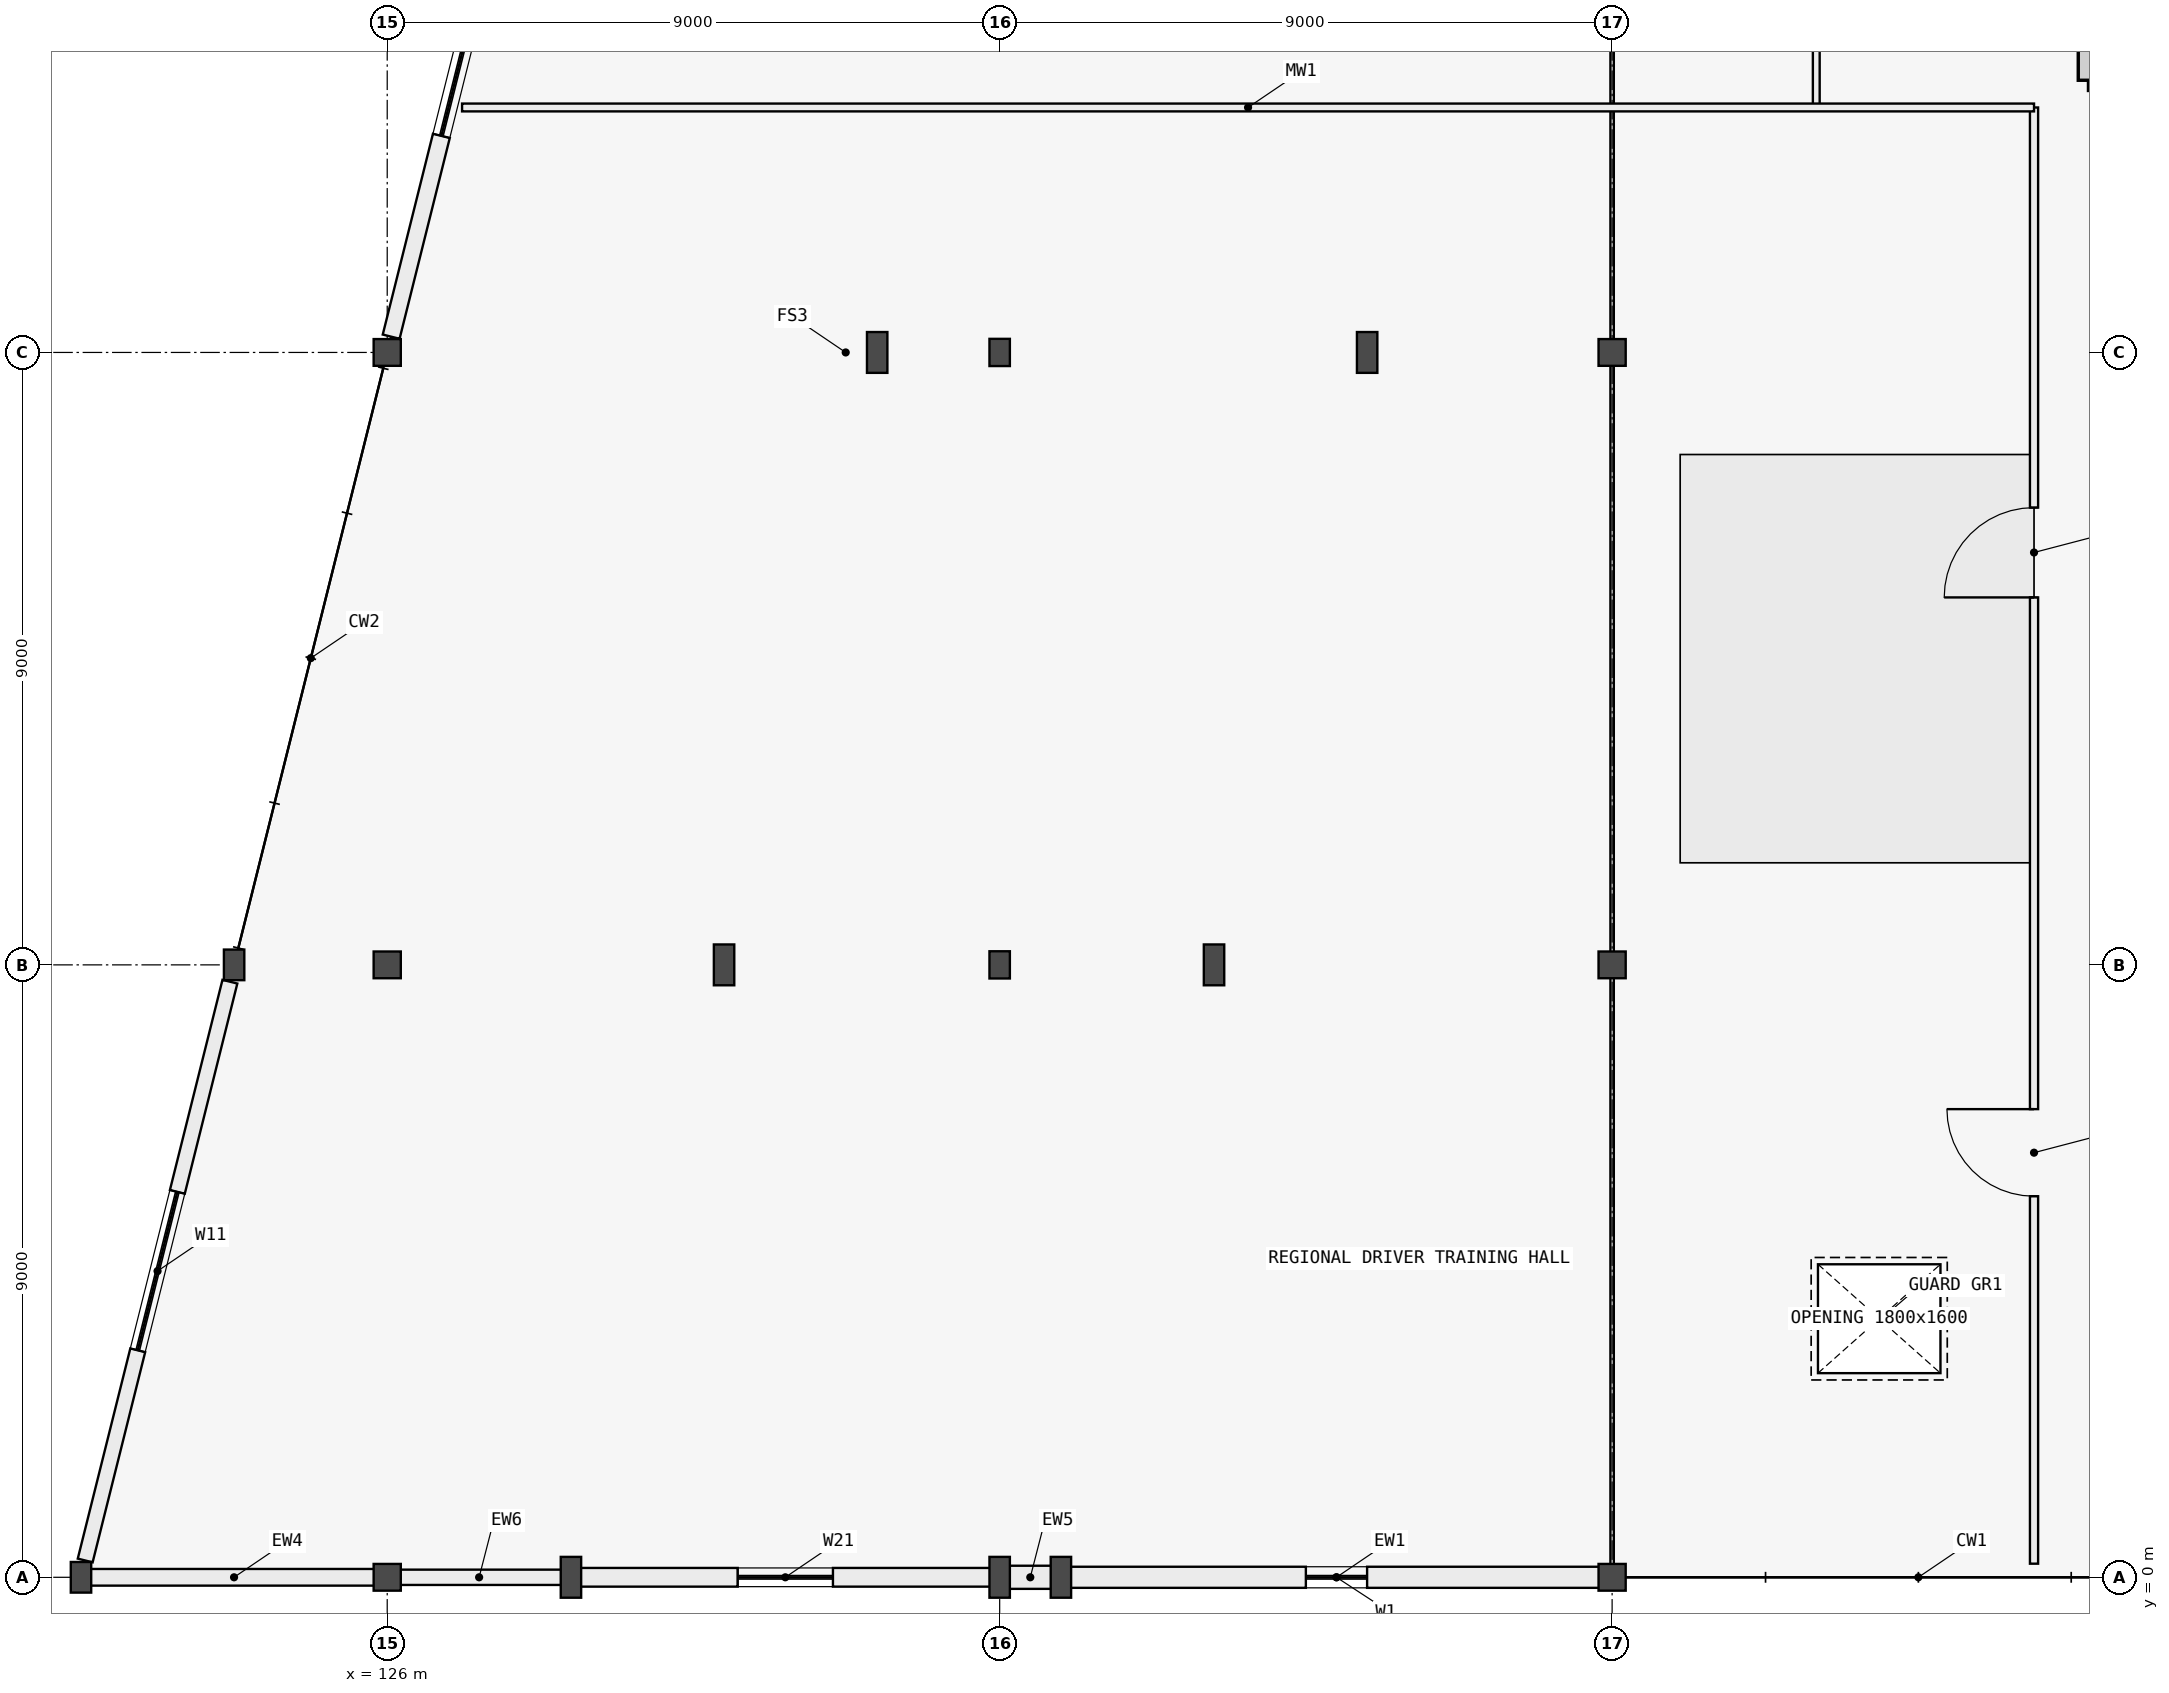
"""IFC4 building model, lengths in metres.
Left out: names, types, materials, properties, quantities, classifications, styles, units other than length and angle.
Written with IfcOpenShell. Run it as: python <this file> out.ifc"""

import sys

from ifc_helpers import new_model, si_unit, direction, frame, frame_2d, origin, origin_2d, place, context, subcontext, project, spatial, rectangle, i_section, extrude, element, fill, save


model = new_model("IFC4")
c1 = context("Model", 3, precision=1e-05, world=origin(), true_north=direction((0.0, 1.0)))
c2 = subcontext(c1, "Body", "Model", "MODEL_VIEW")
j1 = project(units=[si_unit("LENGTHUNIT", "METRE"), si_unit("PLANEANGLEUNIT", "RADIAN")], contexts=[c1])
p1 = place(None, origin())
s1 = spatial("IfcSite", under=j1, at=p1, CompositionType="ELEMENT")
p2 = place(p1, origin())
s2 = spatial("IfcBuilding", under=s1, at=p2, CompositionType="ELEMENT")
p3 = place(p2, frame((0.0, 0.0, 12.6)))
s3 = spatial("IfcBuildingStorey", under=s2, at=p3, CompositionType="ELEMENT", Elevation=12.6)
p4 = place(p3, frame((121.5, 0.0, 0.0), z_axis=(0.0, 0.0, 1.0), x_axis=(1.0, 0.0, 0.0)))
e1 = element("IfcColumn", 1, at=p4, inside=s3, PredefinedType="COLUMN", context=c2, shape_type="SweptSolid", body=[
    extrude(i_section(OverallWidth=0.3, OverallDepth=0.45, WebThickness=0.014, FlangeThickness=0.026, FilletRadius=0.027, at=origin_2d()), origin(), (0.0, 0.0, 1.0), 4.2),
])
p5 = place(p3, frame((126.0, 0.0, 0.0), z_axis=(0.0, 0.0, 1.0), x_axis=(1.0, 0.0, 0.0)))
e2 = element("IfcColumn", 2, at=p5, inside=s3, PredefinedType="COLUMN", context=c2, shape_type="SweptSolid", body=[
    extrude(i_section(OverallWidth=0.399, OverallDepth=0.393, WebThickness=0.018, FlangeThickness=0.028, FilletRadius=0.015, at=origin_2d()), origin(), (0.0, 0.0, 1.0), 4.2),
])
for number, where, z_axis, x_axis in (
    (3, (128.7, 0.0, 0.0), (0.0, 0.0, 1.0), (1.0, 0.0, 0.0)),
    (4, (135.0, 0.0, 0.0), (0.0, 0.0, 1.0), (1.0, 0.0, 0.0)),
    (5, (135.9, 0.0, 0.0), (0.0, 0.0, 1.0), (1.0, 0.0, 0.0)),
):
    element("IfcColumn", number, at=place(p3, frame(where, z_axis=z_axis, x_axis=x_axis)), inside=s3, PredefinedType="COLUMN", context=c2, shape_type="SweptSolid", body=[
        extrude(i_section(OverallWidth=0.3, OverallDepth=0.6, WebThickness=0.015, FlangeThickness=0.03, FilletRadius=0.027, at=origin_2d()), origin(), (0.0, 0.0, 1.0), 4.2),
    ])
p6 = place(p3, frame((144.0, 0.0, 0.0), z_axis=(0.0, 0.0, 1.0), x_axis=(1.0, 0.0, 0.0)))
e6 = element("IfcColumn", 6, at=p6, inside=s3, PredefinedType="COLUMN", context=c2, shape_type="SweptSolid", body=[
    extrude(i_section(OverallWidth=0.399, OverallDepth=0.393, WebThickness=0.018, FlangeThickness=0.028, FilletRadius=0.015, at=origin_2d()), origin(), (0.0, 0.0, 1.0), 4.2),
])
p7 = place(p3, frame((123.75, 9.0, 0.0), z_axis=(0.0, 0.0, 1.0), x_axis=(1.0, 0.0, 0.0)))
e7 = element("IfcColumn", 7, at=p7, inside=s3, PredefinedType="COLUMN", context=c2, shape_type="SweptSolid", body=[
    extrude(i_section(OverallWidth=0.3, OverallDepth=0.45, WebThickness=0.014, FlangeThickness=0.026, FilletRadius=0.027, at=origin_2d()), origin(), (0.0, 0.0, 1.0), 4.2),
])
p8 = place(p3, frame((126.0, 9.0, 0.0), z_axis=(0.0, 0.0, 1.0), x_axis=(1.0, 0.0, 0.0)))
e8 = element("IfcColumn", 8, at=p8, inside=s3, PredefinedType="COLUMN", context=c2, shape_type="SweptSolid", body=[
    extrude(i_section(OverallWidth=0.399, OverallDepth=0.393, WebThickness=0.018, FlangeThickness=0.028, FilletRadius=0.015, at=origin_2d()), origin(), (0.0, 0.0, 1.0), 4.2),
])
p9 = place(p3, frame((130.95, 9.0, 0.0), z_axis=(0.0, 0.0, 1.0), x_axis=(1.0, 0.0, 0.0)))
e9 = element("IfcColumn", 9, at=p9, inside=s3, PredefinedType="COLUMN", context=c2, shape_type="SweptSolid", body=[
    extrude(i_section(OverallWidth=0.3, OverallDepth=0.6, WebThickness=0.015, FlangeThickness=0.03, FilletRadius=0.027, at=origin_2d()), origin(), (0.0, 0.0, 1.0), 4.2),
])
p10 = place(p3, frame((135.0, 9.0, 0.0), z_axis=(0.0, 0.0, 1.0), x_axis=(1.0, 0.0, 0.0)))
e10 = element("IfcColumn", 10, at=p10, inside=s3, PredefinedType="COLUMN", context=c2, shape_type="SweptSolid", body=[
    extrude(i_section(OverallWidth=0.3, OverallDepth=0.4, WebThickness=0.013, FlangeThickness=0.024, FilletRadius=0.027, at=origin_2d()), origin(), (0.0, 0.0, 1.0), 4.2),
])
p11 = place(p3, frame((138.15, 9.0, 0.0), z_axis=(0.0, 0.0, 1.0), x_axis=(1.0, 0.0, 0.0)))
e11 = element("IfcColumn", 11, at=p11, inside=s3, PredefinedType="COLUMN", context=c2, shape_type="SweptSolid", body=[
    extrude(i_section(OverallWidth=0.3, OverallDepth=0.6, WebThickness=0.015, FlangeThickness=0.03, FilletRadius=0.027, at=origin_2d()), origin(), (0.0, 0.0, 1.0), 4.2),
])
for number, where, z_axis, x_axis in (
    (12, (144.0, 9.0, 0.0), (0.0, 0.0, 1.0), (1.0, 0.0, 0.0)),
    (13, (126.0, 18.0, 0.0), (0.0, 0.0, 1.0), (1.0, 0.0, 0.0)),
):
    element("IfcColumn", number, at=place(p3, frame(where, z_axis=z_axis, x_axis=x_axis)), inside=s3, PredefinedType="COLUMN", context=c2, shape_type="SweptSolid", body=[
        extrude(i_section(OverallWidth=0.399, OverallDepth=0.393, WebThickness=0.018, FlangeThickness=0.028, FilletRadius=0.015, at=origin_2d()), origin(), (0.0, 0.0, 1.0), 4.2),
    ])
p12 = place(p3, frame((133.2, 18.0, 0.0), z_axis=(0.0, 0.0, 1.0), x_axis=(1.0, 0.0, 0.0)))
e14 = element("IfcColumn", 14, at=p12, inside=s3, PredefinedType="COLUMN", context=c2, shape_type="SweptSolid", body=[
    extrude(i_section(OverallWidth=0.3, OverallDepth=0.6, WebThickness=0.015, FlangeThickness=0.03, FilletRadius=0.027, at=origin_2d()), origin(), (0.0, 0.0, 1.0), 4.2),
])
p13 = place(p3, frame((135.0, 18.0, 0.0), z_axis=(0.0, 0.0, 1.0), x_axis=(1.0, 0.0, 0.0)))
e15 = element("IfcColumn", 15, at=p13, inside=s3, PredefinedType="COLUMN", context=c2, shape_type="SweptSolid", body=[
    extrude(i_section(OverallWidth=0.3, OverallDepth=0.4, WebThickness=0.013, FlangeThickness=0.024, FilletRadius=0.027, at=origin_2d()), origin(), (0.0, 0.0, 1.0), 4.2),
])
p14 = place(p3, frame((140.4, 18.0, 0.0), z_axis=(0.0, 0.0, 1.0), x_axis=(1.0, 0.0, 0.0)))
e16 = element("IfcColumn", 16, at=p14, inside=s3, PredefinedType="COLUMN", context=c2, shape_type="SweptSolid", body=[
    extrude(i_section(OverallWidth=0.3, OverallDepth=0.6, WebThickness=0.015, FlangeThickness=0.03, FilletRadius=0.027, at=origin_2d()), origin(), (0.0, 0.0, 1.0), 4.2),
])
p15 = place(p3, frame((144.0, 18.0, 0.0), z_axis=(0.0, 0.0, 1.0), x_axis=(1.0, 0.0, 0.0)))
e17 = element("IfcColumn", 17, at=p15, inside=s3, PredefinedType="COLUMN", context=c2, shape_type="SweptSolid", body=[
    extrude(i_section(OverallWidth=0.399, OverallDepth=0.393, WebThickness=0.018, FlangeThickness=0.028, FilletRadius=0.015, at=origin_2d()), origin(), (0.0, 0.0, 1.0), 4.2),
])
p16 = place(p3, frame((121.507, 0.0, 0.0), z_axis=(0.0, 0.0, 1.0), x_axis=(1.0, 0.0, 0.0)))
e18 = element("IfcWall", 18, at=p16, inside=s3, PredefinedType="STANDARD", context=c2, shape_type="SweptSolid", body=[
    extrude(rectangle(XDim=4.484, YDim=0.245, at=frame_2d((2.242, 0.0))), origin(), (0.0, 0.0, 1.0), 3.63),
])
p17 = place(p3, frame((126.009, 0.0, 0.0), z_axis=(0.0, 0.0, 1.0), x_axis=(1.0, 0.0, 0.0)))
e19 = element("IfcWall", 19, at=p17, inside=s3, PredefinedType="STANDARD", context=c2, shape_type="SweptSolid", body=[
    extrude(rectangle(XDim=2.684, YDim=0.225, at=frame_2d((1.342, 0.0))), origin(), (0.0, 0.0, 1.0), 3.63),
])
p18 = place(p3, frame((128.708, 0.0, 0.0), z_axis=(0.0, 0.0, 1.0), x_axis=(1.0, 0.0, 0.0)))
e20 = element("IfcWall", 20, at=p18, inside=s3, PredefinedType="POLYGONAL", context=c2, shape_type="SweptSolid", body=[
    extrude(rectangle(XDim=6.284, YDim=0.275, at=frame_2d((3.142, 0.0))), origin(), (0.0, 0.0, 1.0), 3.63),
])
p19 = place(p18, frame((2.442, 0.0, 0.95)))
e21 = element("IfcOpeningElement", 21, at=p19, cuts=e20, PredefinedType="OPENING", context=c2, shape_type="SweptSolid", body=[
    extrude(rectangle(XDim=1.4, YDim=2.0, at=frame_2d((0.7, 1.0))), frame((0.0, 0.147, 0.0), z_axis=(0.0, -1.0, 0.0), x_axis=(1.0, 0.0, 0.0)), (0.0, 0.0, 1.0), 0.295),
])
p20 = place(p3, frame((135.008, 0.0, 0.0), z_axis=(0.0, 0.0, 1.0), x_axis=(1.0, 0.0, 0.0)))
e22 = element("IfcWall", 22, at=p20, inside=s3, PredefinedType="STANDARD", context=c2, shape_type="SweptSolid", body=[
    extrude(rectangle(XDim=0.885, YDim=0.34, at=frame_2d((0.442, 0.0))), origin(), (0.0, 0.0, 1.0), 3.63),
])
p21 = place(p3, frame((135.908, 0.0, 0.0), z_axis=(0.0, 0.0, 1.0), x_axis=(1.0, 0.0, 0.0)))
e23 = element("IfcWall", 23, at=p21, inside=s3, PredefinedType="STANDARD", context=c2, shape_type="SweptSolid", body=[
    extrude(rectangle(XDim=8.083, YDim=0.31, at=frame_2d((4.042, 0.0))), origin(), (0.0, 0.0, 1.0), 3.6),
])
p22 = place(p21, frame((3.592, 0.0, 0.95)))
e24 = element("IfcOpeningElement", 24, at=p22, cuts=e23, PredefinedType="OPENING", context=c2, shape_type="SweptSolid", body=[
    extrude(rectangle(XDim=0.9, YDim=1.2, at=frame_2d((0.45, 0.6))), frame((0.0, 0.165, 0.0), z_axis=(0.0, -1.0, 0.0), x_axis=(1.0, 0.0, 0.0)), (0.0, 0.0, 1.0), 0.33),
])
p23 = place(p3, frame((121.562, 0.247, 0.0), z_axis=(0.0, 0.0, 1.0), x_axis=(0.242535625036, 0.970142500145, 0.0)))
e25 = element("IfcWall", 25, at=p23, inside=s3, PredefinedType="STANDARD", context=c2, shape_type="SweptSolid", body=[
    extrude(rectangle(XDim=8.768, YDim=0.225, at=frame_2d((4.384, 0.0))), origin(), (0.0, 0.0, 1.0), 3.925),
])
p24 = place(p23, frame((3.184, 0.0, 0.95)))
e26 = element("IfcOpeningElement", 26, at=p24, cuts=e25, PredefinedType="OPENING", context=c2, shape_type="SweptSolid", body=[
    extrude(rectangle(XDim=2.4, YDim=1.8, at=frame_2d((1.2, 0.9))), frame((0.0, 0.123, 0.0), z_axis=(0.0, -1.0, 0.0), x_axis=(1.0, 0.0, 0.0)), (0.0, 0.0, 1.0), 0.245),
])
p25 = place(p3, frame((126.058, 18.232, 0.0), z_axis=(0.0, 0.0, 1.0), x_axis=(0.242522544412, 0.970145770208, 0.0)))
e27 = element("IfcWall", 27, at=p25, inside=s3, PredefinedType="POLYGONAL", context=c2, shape_type="SweptSolid", body=[
    extrude(rectangle(XDim=8.783, YDim=0.255, at=frame_2d((4.392, 0.0))), origin(), (0.0, 0.0, 1.0), 3.45),
])
p26 = place(p25, frame((3.042, 0.0, 0.95)))
e28 = element("IfcOpeningElement", 28, at=p26, cuts=e27, PredefinedType="OPENING", context=c2, shape_type="SweptSolid", body=[
    extrude(rectangle(XDim=2.7, YDim=1.6, at=frame_2d((1.35, 0.8))), frame((0.0, 0.137, 0.0), z_axis=(0.0, -1.0, 0.0), x_axis=(1.0, 0.0, 0.0)), (0.0, 0.0, 1.0), 0.275),
])
p27 = place(p3, frame((151.0, 22.0, 0.0), z_axis=(0.0, 0.0, 1.0), x_axis=(1.0, 0.0, 0.0)))
e29 = element("IfcWall", 29, at=p27, inside=s3, PredefinedType="SHEAR", context=c2, shape_type="SweptSolid", body=[
    extrude(rectangle(XDim=10.2, YDim=0.3, at=frame_2d((5.1, 0.0))), origin(), (0.0, 0.0, 1.0), 3.925),
])
p28 = place(p27, frame((4.75, 0.0, 0.0)))
e30 = element("IfcOpeningElement", 30, at=p28, cuts=e29, PredefinedType="OPENING", context=c2, shape_type="SweptSolid", body=[
    extrude(rectangle(XDim=1.2, YDim=2.15, at=frame_2d((0.6, 1.075))), frame((0.0, 0.16, 0.0), z_axis=(0.0, -1.0, 0.0), x_axis=(1.0, 0.0, 0.0)), (0.0, 0.0, 1.0), 0.32),
])
p29 = place(p3, frame((151.0, 30.2, 0.0), z_axis=(0.0, 0.0, 1.0), x_axis=(0.0, -1.0, 0.0)))
e31 = element("IfcWall", 31, at=p29, inside=s3, PredefinedType="SHEAR", context=c2, shape_type="SweptSolid", body=[
    extrude(rectangle(XDim=8.2, YDim=0.3, at=frame_2d((4.1, 0.0))), origin(), (0.0, 0.0, 1.0), 3.925),
])
p30 = place(p3, frame((150.2, 0.2, 0.0), z_axis=(0.0, 0.0, 1.0), x_axis=(0.0, 1.0, 0.0)))
e32 = element("IfcWall", 32, at=p30, inside=s3, PredefinedType="PARTITIONING", context=c2, shape_type="SweptSolid", body=[
    extrude(rectangle(XDim=21.4, YDim=0.12, at=frame_2d((10.7, 0.0))), origin(), (0.0, 0.0, 1.0), 3.63),
])
p31 = place(p30, frame((5.4, 0.0, 0.0)))
e33 = element("IfcOpeningElement", 33, at=p31, cuts=e32, PredefinedType="OPENING", context=c2, shape_type="SweptSolid", body=[
    extrude(rectangle(XDim=1.28, YDim=2.18, at=frame_2d((0.64, 1.09))), frame((0.0, 0.07, 0.0), z_axis=(0.0, -1.0, 0.0), x_axis=(1.0, 0.0, 0.0)), (0.0, 0.0, 1.0), 0.14),
])
p32 = place(p30, frame((14.2, 0.0, 0.0)))
e34 = element("IfcOpeningElement", 34, at=p32, cuts=e32, PredefinedType="OPENING", context=c2, shape_type="SweptSolid", body=[
    extrude(rectangle(XDim=1.32, YDim=2.2, at=frame_2d((0.66, 1.1))), frame((0.0, 0.07, 0.0), z_axis=(0.0, -1.0, 0.0), x_axis=(1.0, 0.0, 0.0)), (0.0, 0.0, 1.0), 0.14),
])
p33 = place(p3, frame((147.0, 21.6, 0.0), z_axis=(0.0, 0.0, 1.0), x_axis=(0.0, 1.0, 0.0)))
e35 = element("IfcWall", 35, at=p33, inside=s3, PredefinedType="PARTITIONING", context=c2, shape_type="SweptSolid", body=[
    extrude(rectangle(XDim=14.6, YDim=0.1, at=frame_2d((7.3, 0.0))), origin(), (0.0, 0.0, 1.0), 3.925),
])
p34 = place(p33, frame((6.5, 0.0, 0.0)))
e36 = element("IfcOpeningElement", 36, at=p34, cuts=e35, PredefinedType="OPENING", context=c2, shape_type="SweptSolid", body=[
    extrude(rectangle(XDim=1.45, YDim=2.22, at=frame_2d((0.725, 1.11))), frame((0.0, 0.06, 0.0), z_axis=(0.0, -1.0, 0.0), x_axis=(1.0, 0.0, 0.0)), (0.0, 0.0, 1.0), 0.12),
])
p35 = place(p3, frame((127.1, 21.6, 0.0), z_axis=(0.0, 0.0, 1.0), x_axis=(1.0, 0.0, 0.0)))
e37 = element("IfcWall", 37, at=p35, inside=s3, PredefinedType="MOVABLE", context=c2, shape_type="SweptSolid", body=[
    extrude(rectangle(XDim=23.1, YDim=0.115, at=frame_2d((11.55, 0.0))), origin(), (0.0, 0.0, 1.0), 3.925),
])
p36 = place(p19, origin())
e38 = element("IfcWindow", 38, at=p36, inside=s3, PartitioningType="SINGLE_PANEL", PredefinedType="WINDOW", context=c2, shape_type="SweptSolid", body=[
    extrude(rectangle(XDim=1.4, YDim=2.0, at=frame_2d((0.7, 1.0))), frame((0.0, 0.03, 0.0), z_axis=(0.0, -1.0, 0.0), x_axis=(1.0, 0.0, 0.0)), (0.0, 0.0, 1.0), 0.06),
])
fill(e21, e38)
p37 = place(p22, origin())
e39 = element("IfcWindow", 39, at=p37, inside=s3, PartitioningType="SINGLE_PANEL", PredefinedType="WINDOW", context=c2, shape_type="SweptSolid", body=[
    extrude(rectangle(XDim=0.9, YDim=1.2, at=frame_2d((0.45, 0.6))), frame((0.0, 0.03, 0.0), z_axis=(0.0, -1.0, 0.0), x_axis=(1.0, 0.0, 0.0)), (0.0, 0.0, 1.0), 0.06),
])
fill(e24, e39)
p38 = place(p24, origin())
e40 = element("IfcWindow", 40, at=p38, inside=s3, PartitioningType="SINGLE_PANEL", PredefinedType="WINDOW", context=c2, shape_type="SweptSolid", body=[
    extrude(rectangle(XDim=2.4, YDim=1.8, at=frame_2d((1.2, 0.9))), frame((0.0, 0.03, 0.0), z_axis=(0.0, -1.0, 0.0), x_axis=(1.0, 0.0, 0.0)), (0.0, 0.0, 1.0), 0.06),
])
fill(e26, e40)
p39 = place(p26, origin())
e41 = element("IfcWindow", 41, at=p39, inside=s3, PartitioningType="SINGLE_PANEL", PredefinedType="WINDOW", context=c2, shape_type="SweptSolid", body=[
    extrude(rectangle(XDim=2.7, YDim=1.6, at=frame_2d((1.35, 0.8))), frame((0.0, 0.03, 0.0), z_axis=(0.0, -1.0, 0.0), x_axis=(1.0, 0.0, 0.0)), (0.0, 0.0, 1.0), 0.06),
])
fill(e28, e41)
p40 = place(p31, origin())
e42 = element("IfcDoor", 42, at=p40, inside=s3, OperationType="SINGLE_SWING_RIGHT", PredefinedType="DOOR", context=c2, shape_type="SweptSolid", body=[
    extrude(rectangle(XDim=1.28, YDim=2.18, at=frame_2d((0.64, 1.09))), frame((0.0, 0.025, 0.0), z_axis=(0.0, -1.0, 0.0), x_axis=(1.0, 0.0, 0.0)), (0.0, 0.0, 1.0), 0.05),
])
fill(e33, e42)
p41 = place(p32, origin())
e43 = element("IfcDoor", 43, at=p41, inside=s3, OperationType="SINGLE_SWING_LEFT", PredefinedType="DOOR", context=c2, shape_type="SweptSolid", body=[
    extrude(rectangle(XDim=1.32, YDim=2.2, at=frame_2d((0.66, 1.1))), frame((0.0, 0.025, 0.0), z_axis=(0.0, -1.0, 0.0), x_axis=(1.0, 0.0, 0.0)), (0.0, 0.0, 1.0), 0.05),
])
fill(e34, e43)
save(model, sys.argv[1])
